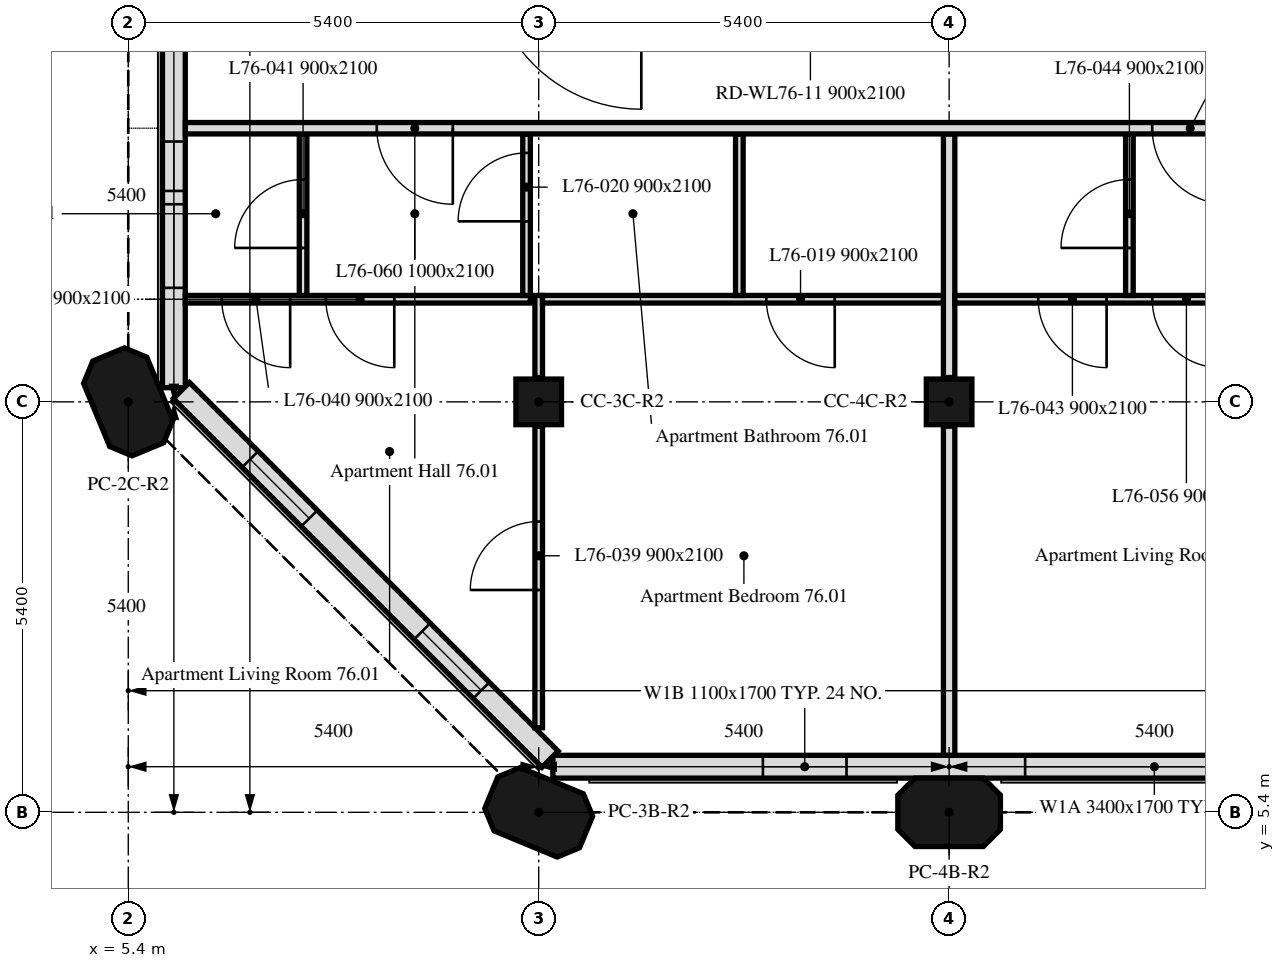
"""IFC4 building model, lengths in metres.
Left out: names, types, materials, properties, quantities, classifications, styles, units other than length and angle.
Written with IfcOpenShell. Run it as: python <this file> out.ifc"""

import sys

from ifc_helpers import new_model, si_unit, direction, frame, frame_2d, origin, origin_2d, place, context, subcontext, project, spatial, polyline, rectangle, outline, extrude, element, fill, save


model = new_model("IFC4")
c1 = context("Model", 3, precision=1e-05, world=origin(), true_north=direction((0.0, 1.0)))
c2 = subcontext(c1, "Body", "Model", "MODEL_VIEW")
j1 = project(units=[si_unit("LENGTHUNIT", "METRE"), si_unit("PLANEANGLEUNIT", "RADIAN")], contexts=[c1])
p1 = place(None, origin())
s1 = spatial("IfcSite", under=j1, at=p1, CompositionType="ELEMENT")
p2 = place(p1, origin())
s2 = spatial("IfcBuilding", under=s1, at=p2, CompositionType="ELEMENT")
p3 = place(p2, frame((0.0, 0.0, 304.9)))
s3 = spatial("IfcBuildingStorey", under=s2, at=p3, CompositionType="ELEMENT", Elevation=304.9)
for number, where, z_axis, x_axis in (
    (1, (10.8, 5.4, 0.0), (0.0, 0.0, 1.0), (-0.924, 0.383, 0.0)),
    (2, (16.2, 5.4, 0.0), (0.0, 0.0, 1.0), (1.0, 0.0, 0.0)),
    (3, (5.4, 10.8, 0.0), (0.0, 0.0, 1.0), (-0.383, 0.924, 0.0)),
):
    element("IfcColumn", number, at=place(p3, frame(where, z_axis=z_axis, x_axis=x_axis)), inside=s3, PredefinedType="COLUMN", context=c2, shape_type="SweptSolid", body=[
        extrude(outline(polyline([(-0.45, -0.45), (0.45, -0.45), (0.675, -0.225), (0.675, 0.225), (0.45, 0.45), (-0.45, 0.45), (-0.675, 0.225), (-0.675, -0.225), (-0.45, -0.45)])), origin(), (0.0, 0.0, 1.0), 2.8),
    ])
for number, where, z_axis, x_axis in (
    (4, (10.8, 10.8, 0.0), (0.0, 0.0, 1.0), (1.0, 0.0, 0.0)),
    (5, (16.2, 10.8, 0.0), (0.0, 0.0, 1.0), (1.0, 0.0, 0.0)),
):
    element("IfcColumn", number, at=place(p3, frame(where, z_axis=z_axis, x_axis=x_axis)), inside=s3, PredefinedType="COLUMN", context=c2, shape_type="SweptSolid", body=[
        extrude(rectangle(XDim=0.6, YDim=0.6, at=origin_2d()), origin(), (0.0, 0.0, 1.0), 2.8),
    ])
p4 = place(p3, frame((10.986, 6.0, 0.0), z_axis=(0.0, 0.0, 1.0), x_axis=(1.0, 0.0, 0.0)))
e6 = element("IfcWall", 6, at=p4, inside=s3, PredefinedType="SOLIDWALL", context=c2, shape_type="SweptSolid", body=[
    extrude(rectangle(XDim=32.027, YDim=0.3, at=frame_2d((16.014, 0.0))), origin(), (0.0, 0.0, 1.0), 2.8),
])
p5 = place(p4, frame((2.764, 0.0, 0.9)))
e7 = element("IfcOpeningElement", 7, at=p5, cuts=e6, PredefinedType="OPENING", context=c2, shape_type="SweptSolid", body=[
    extrude(rectangle(XDim=1.1, YDim=1.7, at=frame_2d((0.55, 0.85))), frame((0.0, 0.16, 0.0), z_axis=(0.0, -1.0, 0.0), x_axis=(1.0, 0.0, 0.0)), (0.0, 0.0, 1.0), 0.32),
])
p6 = place(p4, frame((6.214, 0.0, 0.9)))
e8 = element("IfcOpeningElement", 8, at=p6, cuts=e6, PredefinedType="OPENING", context=c2, shape_type="SweptSolid", body=[
    extrude(rectangle(XDim=3.4, YDim=1.7, at=frame_2d((1.7, 0.85))), frame((0.0, 0.16, 0.0), z_axis=(0.0, -1.0, 0.0), x_axis=(1.0, 0.0, 0.0)), (0.0, 0.0, 1.0), 0.32),
])
p7 = place(p4, frame((13.564, 0.0, 0.9)))
e9 = element("IfcOpeningElement", 9, at=p7, cuts=e6, PredefinedType="OPENING", context=c2, shape_type="SweptSolid", body=[
    extrude(rectangle(XDim=1.1, YDim=1.7, at=frame_2d((0.55, 0.85))), frame((0.0, 0.16, 0.0), z_axis=(0.0, -1.0, 0.0), x_axis=(1.0, 0.0, 0.0)), (0.0, 0.0, 1.0), 0.32),
])
p8 = place(p4, frame((17.014, 0.0, 0.9)))
e10 = element("IfcOpeningElement", 10, at=p8, cuts=e6, PredefinedType="OPENING", context=c2, shape_type="SweptSolid", body=[
    extrude(rectangle(XDim=3.4, YDim=1.7, at=frame_2d((1.7, 0.85))), frame((0.0, 0.16, 0.0), z_axis=(0.0, -1.0, 0.0), x_axis=(1.0, 0.0, 0.0)), (0.0, 0.0, 1.0), 0.32),
])
p9 = place(p4, frame((24.364, 0.0, 0.9)))
e11 = element("IfcOpeningElement", 11, at=p9, cuts=e6, PredefinedType="OPENING", context=c2, shape_type="SweptSolid", body=[
    extrude(rectangle(XDim=1.1, YDim=1.7, at=frame_2d((0.55, 0.85))), frame((0.0, 0.16, 0.0), z_axis=(0.0, -1.0, 0.0), x_axis=(1.0, 0.0, 0.0)), (0.0, 0.0, 1.0), 0.32),
])
p10 = place(p4, frame((27.814, 0.0, 0.9)))
e12 = element("IfcOpeningElement", 12, at=p10, cuts=e6, PredefinedType="OPENING", context=c2, shape_type="SweptSolid", body=[
    extrude(rectangle(XDim=3.4, YDim=1.7, at=frame_2d((1.7, 0.85))), frame((0.0, 0.16, 0.0), z_axis=(0.0, -1.0, 0.0), x_axis=(1.0, 0.0, 0.0)), (0.0, 0.0, 1.0), 0.32),
])
p11 = place(p3, frame((6.0, 16.2, 0.0), z_axis=(0.0, 0.0, 1.0), x_axis=(0.0, -1.0, 0.0)))
e13 = element("IfcWall", 13, at=p11, inside=s3, PredefinedType="SOLIDWALL", context=c2, shape_type="SweptSolid", body=[
    extrude(rectangle(XDim=5.214, YDim=0.3, at=frame_2d((2.607, 0.0))), origin(), (0.0, 0.0, 1.0), 2.8),
])
p12 = place(p11, frame((1.975, 0.0, 0.9)))
e14 = element("IfcOpeningElement", 14, at=p12, cuts=e13, PredefinedType="OPENING", context=c2, shape_type="SweptSolid", body=[
    extrude(rectangle(XDim=0.65, YDim=1.7, at=frame_2d((0.325, 0.85))), frame((0.0, 0.16, 0.0), z_axis=(0.0, -1.0, 0.0), x_axis=(1.0, 0.0, 0.0)), (0.0, 0.0, 1.0), 0.32),
])
p13 = place(p11, frame((2.8, 0.0, 0.9)))
e15 = element("IfcOpeningElement", 15, at=p13, cuts=e13, PredefinedType="OPENING", context=c2, shape_type="SweptSolid", body=[
    extrude(rectangle(XDim=1.1, YDim=1.7, at=frame_2d((0.55, 0.85))), frame((0.0, 0.16, 0.0), z_axis=(0.0, -1.0, 0.0), x_axis=(1.0, 0.0, 0.0)), (0.0, 0.0, 1.0), 0.32),
])
p14 = place(p3, frame((6.099, 10.949, 0.0), z_axis=(0.0, 0.0, 1.0), x_axis=(0.707106781187, -0.707106781187, 0.0)))
e16 = element("IfcWall", 16, at=p14, inside=s3, PredefinedType="SOLIDWALL", context=c2, shape_type="SweptSolid", body=[
    extrude(rectangle(XDim=6.86, YDim=0.3, at=frame_2d((3.43, 0.0))), origin(), (0.0, 0.0, 1.0), 2.8),
])
p15 = place(p14, frame((1.28, 0.0, 0.9)))
e17 = element("IfcOpeningElement", 17, at=p15, cuts=e16, PredefinedType="OPENING", context=c2, shape_type="SweptSolid", body=[
    extrude(rectangle(XDim=1.1, YDim=1.7, at=frame_2d((0.55, 0.85))), frame((0.0, 0.16, 0.0), z_axis=(0.0, -1.0, 0.0), x_axis=(1.0, 0.0, 0.0)), (0.0, 0.0, 1.0), 0.32),
])
p16 = place(p14, frame((4.48, 0.0, 0.9)))
e18 = element("IfcOpeningElement", 18, at=p16, cuts=e16, PredefinedType="OPENING", context=c2, shape_type="SweptSolid", body=[
    extrude(rectangle(XDim=1.1, YDim=1.7, at=frame_2d((0.55, 0.85))), frame((0.0, 0.16, 0.0), z_axis=(0.0, -1.0, 0.0), x_axis=(1.0, 0.0, 0.0)), (0.0, 0.0, 1.0), 0.32),
])
p17 = place(p3, frame((10.8, 6.512, 0.0), z_axis=(0.0, 0.0, 1.0), x_axis=(0.0, 1.0, 0.0)))
e19 = element("IfcWall", 19, at=p17, inside=s3, PredefinedType="PARTITIONING", context=c2, shape_type="SweptSolid", body=[
    extrude(rectangle(XDim=3.968, YDim=0.1, at=frame_2d((1.984, 0.0))), origin(), (0.0, 0.0, 1.0), 2.8),
])
p18 = place(p17, frame((1.813, 0.0, 0.0)))
e20 = element("IfcOpeningElement", 20, at=p18, cuts=e19, PredefinedType="OPENING", context=c2, shape_type="SweptSolid", body=[
    extrude(rectangle(XDim=0.9, YDim=2.1, at=frame_2d((0.45, 1.05))), frame((0.0, 0.05, 0.0), z_axis=(0.0, -1.0, 0.0), x_axis=(1.0, 0.0, 0.0)), (0.0, 0.0, 1.0), 0.1),
])
p19 = place(p3, frame((10.8, 11.12, 0.0), z_axis=(0.0, 0.0, 1.0), x_axis=(0.0, 1.0, 0.0)))
e21 = element("IfcWall", 21, at=p19, inside=s3, PredefinedType="PARTITIONING", context=c2, shape_type="SweptSolid", body=[
    extrude(rectangle(XDim=1.08, YDim=0.1, at=frame_2d((0.54, 0.0))), origin(), (0.0, 0.0, 1.0), 2.8),
])
p20 = place(p3, frame((10.69, 12.15, 0.0), z_axis=(0.0, 0.0, 1.0), x_axis=(-1.0, 0.0, 0.0)))
e22 = element("IfcWall", 22, at=p20, inside=s3, PredefinedType="PARTITIONING", context=c2, shape_type="SweptSolid", body=[
    extrude(rectangle(XDim=4.539, YDim=0.1, at=frame_2d((2.27, 0.0))), origin(), (0.0, 0.0, 1.0), 2.8),
])
p21 = place(p20, frame((3.16, 0.0, 0.0)))
e23 = element("IfcOpeningElement", 23, at=p21, cuts=e22, PredefinedType="OPENING", context=c2, shape_type="SweptSolid", body=[
    extrude(rectangle(XDim=0.9, YDim=2.1, at=frame_2d((0.45, 1.05))), frame((0.0, 0.05, 0.0), z_axis=(0.0, -1.0, 0.0), x_axis=(1.0, 0.0, 0.0)), (0.0, 0.0, 1.0), 0.1),
])
p22 = place(p20, frame((1.79, 0.0, 0.0)))
e24 = element("IfcOpeningElement", 24, at=p22, cuts=e22, PredefinedType="OPENING", context=c2, shape_type="SweptSolid", body=[
    extrude(rectangle(XDim=0.9, YDim=2.1, at=frame_2d((0.45, 1.05))), frame((0.0, 0.05, 0.0), z_axis=(0.0, -1.0, 0.0), x_axis=(1.0, 0.0, 0.0)), (0.0, 0.0, 1.0), 0.1),
])
p23 = place(p3, frame((16.2, 6.151, 0.0), z_axis=(0.0, 0.0, 1.0), x_axis=(0.0, 1.0, 0.0)))
e25 = element("IfcWall", 25, at=p23, inside=s3, PredefinedType="PARTITIONING", context=c2, shape_type="SweptSolid", body=[
    extrude(rectangle(XDim=4.329, YDim=0.15, at=frame_2d((2.165, 0.0))), origin(), (0.0, 0.0, 1.0), 2.8),
])
p24 = place(p3, frame((16.125, 12.15, 0.0), z_axis=(0.0, 0.0, 1.0), x_axis=(-1.0, 0.0, 0.0)))
e26 = element("IfcWall", 26, at=p24, inside=s3, PredefinedType="PARTITIONING", context=c2, shape_type="SweptSolid", body=[
    extrude(rectangle(XDim=5.275, YDim=0.1, at=frame_2d((2.637, 0.0))), origin(), (0.0, 0.0, 1.0), 2.8),
])
p25 = place(p24, frame((1.43, 0.0, 0.0)))
e27 = element("IfcOpeningElement", 27, at=p25, cuts=e26, PredefinedType="OPENING", context=c2, shape_type="SweptSolid", body=[
    extrude(rectangle(XDim=0.9, YDim=2.1, at=frame_2d((0.45, 1.05))), frame((0.0, 0.05, 0.0), z_axis=(0.0, -1.0, 0.0), x_axis=(1.0, 0.0, 0.0)), (0.0, 0.0, 1.0), 0.1),
])
p26 = place(p3, frame((7.7, 12.2, 0.0), z_axis=(0.0, 0.0, 1.0), x_axis=(0.0, 1.0, 0.0)))
e28 = element("IfcWall", 28, at=p26, inside=s3, PredefinedType="PARTITIONING", context=c2, shape_type="SweptSolid", body=[
    extrude(rectangle(XDim=2.125, YDim=0.1, at=frame_2d((1.062, 0.0))), origin(), (0.0, 0.0, 1.0), 2.8),
])
p27 = place(p26, frame((0.625, 0.0, 0.0)))
e29 = element("IfcOpeningElement", 29, at=p27, cuts=e28, PredefinedType="OPENING", context=c2, shape_type="SweptSolid", body=[
    extrude(rectangle(XDim=0.9, YDim=2.1, at=frame_2d((0.45, 1.05))), frame((0.0, 0.05, 0.0), z_axis=(0.0, -1.0, 0.0), x_axis=(1.0, 0.0, 0.0)), (0.0, 0.0, 1.0), 0.1),
])
p28 = place(p3, frame((10.64, 12.2, 0.0), z_axis=(0.0, 0.0, 1.0), x_axis=(0.0, 1.0, 0.0)))
e30 = element("IfcWall", 30, at=p28, inside=s3, PredefinedType="PARTITIONING", context=c2, shape_type="SweptSolid", body=[
    extrude(rectangle(XDim=2.125, YDim=0.1, at=frame_2d((1.062, 0.0))), origin(), (0.0, 0.0, 1.0), 2.8),
])
p29 = place(p28, frame((0.975, 0.0, 0.0)))
e31 = element("IfcOpeningElement", 31, at=p29, cuts=e30, PredefinedType="OPENING", context=c2, shape_type="SweptSolid", body=[
    extrude(rectangle(XDim=0.9, YDim=2.1, at=frame_2d((0.45, 1.05))), frame((0.0, 0.05, 0.0), z_axis=(0.0, -1.0, 0.0), x_axis=(1.0, 0.0, 0.0)), (0.0, 0.0, 1.0), 0.1),
])
p30 = place(p3, frame((13.44, 12.2, 0.0), z_axis=(0.0, 0.0, 1.0), x_axis=(0.0, 1.0, 0.0)))
e32 = element("IfcWall", 32, at=p30, inside=s3, PredefinedType="PARTITIONING", context=c2, shape_type="SweptSolid", body=[
    extrude(rectangle(XDim=2.125, YDim=0.1, at=frame_2d((1.062, 0.0))), origin(), (0.0, 0.0, 1.0), 2.8),
])
p31 = place(p3, frame((16.2, 11.12, 0.0), z_axis=(0.0, 0.0, 1.0), x_axis=(0.0, 1.0, 0.0)))
e33 = element("IfcWall", 33, at=p31, inside=s3, PredefinedType="PARTITIONING", context=c2, shape_type="SweptSolid", body=[
    extrude(rectangle(XDim=3.205, YDim=0.15, at=frame_2d((1.603, 0.0))), origin(), (0.0, 0.0, 1.0), 2.8),
])
p32 = place(p3, frame((21.372, 12.15, 0.0), z_axis=(0.0, 0.0, 1.0), x_axis=(-1.0, 0.0, 0.0)))
e34 = element("IfcWall", 34, at=p32, inside=s3, PredefinedType="PARTITIONING", context=c2, shape_type="SweptSolid", body=[
    extrude(rectangle(XDim=5.097, YDim=0.1, at=frame_2d((2.549, 0.0))), origin(), (0.0, 0.0, 1.0), 2.8),
])
p33 = place(p32, frame((3.1, 0.0, 0.0)))
e35 = element("IfcOpeningElement", 35, at=p33, cuts=e34, PredefinedType="OPENING", context=c2, shape_type="SweptSolid", body=[
    extrude(rectangle(XDim=0.9, YDim=2.1, at=frame_2d((0.45, 1.05))), frame((0.0, 0.05, 0.0), z_axis=(0.0, -1.0, 0.0), x_axis=(1.0, 0.0, 0.0)), (0.0, 0.0, 1.0), 0.1),
])
p34 = place(p32, frame((1.6, 0.0, 0.0)))
e36 = element("IfcOpeningElement", 36, at=p34, cuts=e34, PredefinedType="OPENING", context=c2, shape_type="SweptSolid", body=[
    extrude(rectangle(XDim=0.9, YDim=2.1, at=frame_2d((0.45, 1.05))), frame((0.0, 0.05, 0.0), z_axis=(0.0, -1.0, 0.0), x_axis=(1.0, 0.0, 0.0)), (0.0, 0.0, 1.0), 0.1),
])
p35 = place(p3, frame((18.572, 12.2, 0.0), z_axis=(0.0, 0.0, 1.0), x_axis=(0.0, 1.0, 0.0)))
e37 = element("IfcWall", 37, at=p35, inside=s3, PredefinedType="PARTITIONING", context=c2, shape_type="SweptSolid", body=[
    extrude(rectangle(XDim=2.125, YDim=0.1, at=frame_2d((1.062, 0.0))), origin(), (0.0, 0.0, 1.0), 2.8),
])
p36 = place(p35, frame((0.625, 0.0, 0.0)))
e38 = element("IfcOpeningElement", 38, at=p36, cuts=e37, PredefinedType="OPENING", context=c2, shape_type="SweptSolid", body=[
    extrude(rectangle(XDim=0.9, YDim=2.1, at=frame_2d((0.45, 1.05))), frame((0.0, 0.05, 0.0), z_axis=(0.0, -1.0, 0.0), x_axis=(1.0, 0.0, 0.0)), (0.0, 0.0, 1.0), 0.1),
])
p37 = place(p3, frame((47.849, 14.4, 0.0), z_axis=(0.0, 0.0, 1.0), x_axis=(-1.0, 0.0, 0.0)))
e39 = element("IfcWall", 39, at=p37, inside=s3, PredefinedType="PARTITIONING", context=c2, shape_type="SweptSolid", body=[
    extrude(rectangle(XDim=41.698, YDim=0.15, at=frame_2d((20.849, 0.0))), origin(), (0.0, 0.0, 1.0), 2.8),
])
p38 = place(p37, frame((38.179, 0.0, 0.0)))
e40 = element("IfcOpeningElement", 40, at=p38, cuts=e39, PredefinedType="OPENING", context=c2, shape_type="SweptSolid", body=[
    extrude(rectangle(XDim=1.0, YDim=2.1, at=frame_2d((0.5, 1.05))), frame((0.0, 0.075, 0.0), z_axis=(0.0, -1.0, 0.0), x_axis=(1.0, 0.0, 0.0)), (0.0, 0.0, 1.0), 0.15),
])
p39 = place(p37, frame((27.977, 0.0, 0.0)))
e41 = element("IfcOpeningElement", 41, at=p39, cuts=e39, PredefinedType="OPENING", context=c2, shape_type="SweptSolid", body=[
    extrude(rectangle(XDim=1.0, YDim=2.1, at=frame_2d((0.5, 1.05))), frame((0.0, 0.075, 0.0), z_axis=(0.0, -1.0, 0.0), x_axis=(1.0, 0.0, 0.0)), (0.0, 0.0, 1.0), 0.15),
])
p40 = place(p37, frame((16.399, 0.0, 0.0)))
e42 = element("IfcOpeningElement", 42, at=p40, cuts=e39, PredefinedType="OPENING", context=c2, shape_type="SweptSolid", body=[
    extrude(rectangle(XDim=1.0, YDim=2.1, at=frame_2d((0.5, 1.05))), frame((0.0, 0.075, 0.0), z_axis=(0.0, -1.0, 0.0), x_axis=(1.0, 0.0, 0.0)), (0.0, 0.0, 1.0), 0.15),
])
p41 = place(p37, frame((5.476, 0.0, 0.0)))
e43 = element("IfcOpeningElement", 43, at=p41, cuts=e39, PredefinedType="OPENING", context=c2, shape_type="SweptSolid", body=[
    extrude(rectangle(XDim=1.0, YDim=2.1, at=frame_2d((0.5, 1.05))), frame((0.0, 0.075, 0.0), z_axis=(0.0, -1.0, 0.0), x_axis=(1.0, 0.0, 0.0)), (0.0, 0.0, 1.0), 0.15),
])
p42 = place(p5, origin())
e44 = element("IfcWindow", 44, at=p42, inside=s3, PartitioningType="SINGLE_PANEL", PredefinedType="WINDOW", context=c2, shape_type="SweptSolid", body=[
    extrude(rectangle(XDim=1.1, YDim=1.7, at=frame_2d((0.55, 0.85))), frame((0.0, 0.03, 0.0), z_axis=(0.0, -1.0, 0.0), x_axis=(1.0, 0.0, 0.0)), (0.0, 0.0, 1.0), 0.06),
])
fill(e7, e44)
p43 = place(p6, origin())
e45 = element("IfcWindow", 45, at=p43, inside=s3, PartitioningType="SINGLE_PANEL", PredefinedType="WINDOW", context=c2, shape_type="SweptSolid", body=[
    extrude(rectangle(XDim=3.4, YDim=1.7, at=frame_2d((1.7, 0.85))), frame((0.0, 0.03, 0.0), z_axis=(0.0, -1.0, 0.0), x_axis=(1.0, 0.0, 0.0)), (0.0, 0.0, 1.0), 0.06),
])
fill(e8, e45)
p44 = place(p12, origin())
e46 = element("IfcWindow", 46, at=p44, inside=s3, PartitioningType="SINGLE_PANEL", PredefinedType="WINDOW", context=c2, shape_type="SweptSolid", body=[
    extrude(rectangle(XDim=0.65, YDim=1.7, at=frame_2d((0.325, 0.85))), frame((0.0, 0.03, 0.0), z_axis=(0.0, -1.0, 0.0), x_axis=(1.0, 0.0, 0.0)), (0.0, 0.0, 1.0), 0.06),
])
fill(e14, e46)
p45 = place(p13, origin())
e47 = element("IfcWindow", 47, at=p45, inside=s3, PartitioningType="SINGLE_PANEL", PredefinedType="WINDOW", context=c2, shape_type="SweptSolid", body=[
    extrude(rectangle(XDim=1.1, YDim=1.7, at=frame_2d((0.55, 0.85))), frame((0.0, 0.03, 0.0), z_axis=(0.0, -1.0, 0.0), x_axis=(1.0, 0.0, 0.0)), (0.0, 0.0, 1.0), 0.06),
])
fill(e15, e47)
p46 = place(p15, origin())
e48 = element("IfcWindow", 48, at=p46, inside=s3, PartitioningType="SINGLE_PANEL", PredefinedType="WINDOW", context=c2, shape_type="SweptSolid", body=[
    extrude(rectangle(XDim=1.1, YDim=1.7, at=frame_2d((0.55, 0.85))), frame((0.0, 0.03, 0.0), z_axis=(0.0, -1.0, 0.0), x_axis=(1.0, 0.0, 0.0)), (0.0, 0.0, 1.0), 0.06),
])
fill(e17, e48)
p47 = place(p16, origin())
e49 = element("IfcWindow", 49, at=p47, inside=s3, PartitioningType="SINGLE_PANEL", PredefinedType="WINDOW", context=c2, shape_type="SweptSolid", body=[
    extrude(rectangle(XDim=1.1, YDim=1.7, at=frame_2d((0.55, 0.85))), frame((0.0, 0.03, 0.0), z_axis=(0.0, -1.0, 0.0), x_axis=(1.0, 0.0, 0.0)), (0.0, 0.0, 1.0), 0.06),
])
fill(e18, e49)
p48 = place(p25, origin())
e50 = element("IfcDoor", 50, at=p48, inside=s3, OperationType="SINGLE_SWING_LEFT", PredefinedType="DOOR", context=c2, shape_type="SweptSolid", body=[
    extrude(rectangle(XDim=0.9, YDim=2.1, at=frame_2d((0.45, 1.05))), frame((0.0, 0.025, 0.0), z_axis=(0.0, -1.0, 0.0), x_axis=(1.0, 0.0, 0.0)), (0.0, 0.0, 1.0), 0.05),
])
fill(e27, e50)
p49 = place(p29, origin())
e51 = element("IfcDoor", 51, at=p49, inside=s3, OperationType="SINGLE_SWING_RIGHT", PredefinedType="DOOR", context=c2, shape_type="SweptSolid", body=[
    extrude(rectangle(XDim=0.9, YDim=2.1, at=frame_2d((0.45, 1.05))), frame((0.0, 0.025, 0.0), z_axis=(0.0, -1.0, 0.0), x_axis=(1.0, 0.0, 0.0)), (0.0, 0.0, 1.0), 0.05),
])
fill(e31, e51)
p50 = place(p18, origin())
e52 = element("IfcDoor", 52, at=p50, inside=s3, OperationType="SINGLE_SWING_RIGHT", PredefinedType="DOOR", context=c2, shape_type="SweptSolid", body=[
    extrude(rectangle(XDim=0.9, YDim=2.1, at=frame_2d((0.45, 1.05))), frame((0.0, 0.025, 0.0), z_axis=(0.0, -1.0, 0.0), x_axis=(1.0, 0.0, 0.0)), (0.0, 0.0, 1.0), 0.05),
])
fill(e20, e52)
p51 = place(p21, origin())
e53 = element("IfcDoor", 53, at=p51, inside=s3, OperationType="SINGLE_SWING_RIGHT", PredefinedType="DOOR", context=c2, shape_type="SweptSolid", body=[
    extrude(rectangle(XDim=0.9, YDim=2.1, at=frame_2d((0.45, 1.05))), frame((0.0, 0.025, 0.0), z_axis=(0.0, -1.0, 0.0), x_axis=(1.0, 0.0, 0.0)), (0.0, 0.0, 1.0), 0.05),
])
fill(e23, e53)
p52 = place(p27, origin())
e54 = element("IfcDoor", 54, at=p52, inside=s3, OperationType="SINGLE_SWING_RIGHT", PredefinedType="DOOR", context=c2, shape_type="SweptSolid", body=[
    extrude(rectangle(XDim=0.9, YDim=2.1, at=frame_2d((0.45, 1.05))), frame((0.0, 0.025, 0.0), z_axis=(0.0, -1.0, 0.0), x_axis=(1.0, 0.0, 0.0)), (0.0, 0.0, 1.0), 0.05),
])
fill(e29, e54)
p53 = place(p33, origin())
e55 = element("IfcDoor", 55, at=p53, inside=s3, OperationType="SINGLE_SWING_RIGHT", PredefinedType="DOOR", context=c2, shape_type="SweptSolid", body=[
    extrude(rectangle(XDim=0.9, YDim=2.1, at=frame_2d((0.45, 1.05))), frame((0.0, 0.025, 0.0), z_axis=(0.0, -1.0, 0.0), x_axis=(1.0, 0.0, 0.0)), (0.0, 0.0, 1.0), 0.05),
])
fill(e35, e55)
p54 = place(p36, origin())
e56 = element("IfcDoor", 56, at=p54, inside=s3, OperationType="SINGLE_SWING_LEFT", PredefinedType="DOOR", context=c2, shape_type="SweptSolid", body=[
    extrude(rectangle(XDim=0.9, YDim=2.1, at=frame_2d((0.45, 1.05))), frame((0.0, 0.025, 0.0), z_axis=(0.0, -1.0, 0.0), x_axis=(1.0, 0.0, 0.0)), (0.0, 0.0, 1.0), 0.05),
])
fill(e38, e56)
p55 = place(p22, origin())
e57 = element("IfcDoor", 57, at=p55, inside=s3, OperationType="SINGLE_SWING_LEFT", PredefinedType="DOOR", context=c2, shape_type="SweptSolid", body=[
    extrude(rectangle(XDim=0.9, YDim=2.1, at=frame_2d((0.45, 1.05))), frame((0.0, 0.025, 0.0), z_axis=(0.0, -1.0, 0.0), x_axis=(1.0, 0.0, 0.0)), (0.0, 0.0, 1.0), 0.05),
])
fill(e24, e57)
p56 = place(p34, origin())
e58 = element("IfcDoor", 58, at=p56, inside=s3, OperationType="SINGLE_SWING_LEFT", PredefinedType="DOOR", context=c2, shape_type="SweptSolid", body=[
    extrude(rectangle(XDim=0.9, YDim=2.1, at=frame_2d((0.45, 1.05))), frame((0.0, 0.025, 0.0), z_axis=(0.0, -1.0, 0.0), x_axis=(1.0, 0.0, 0.0)), (0.0, 0.0, 1.0), 0.05),
])
fill(e36, e58)
p57 = place(p38, origin())
e59 = element("IfcDoor", 59, at=p57, inside=s3, OperationType="SINGLE_SWING_RIGHT", PredefinedType="DOOR", context=c2, shape_type="SweptSolid", body=[
    extrude(rectangle(XDim=1.0, YDim=2.1, at=frame_2d((0.5, 1.05))), frame((0.0, 0.025, 0.0), z_axis=(0.0, -1.0, 0.0), x_axis=(1.0, 0.0, 0.0)), (0.0, 0.0, 1.0), 0.05),
])
fill(e40, e59)
p58 = place(p39, origin())
e60 = element("IfcDoor", 60, at=p58, inside=s3, OperationType="SINGLE_SWING_RIGHT", PredefinedType="DOOR", context=c2, shape_type="SweptSolid", body=[
    extrude(rectangle(XDim=1.0, YDim=2.1, at=frame_2d((0.5, 1.05))), frame((0.0, 0.025, 0.0), z_axis=(0.0, -1.0, 0.0), x_axis=(1.0, 0.0, 0.0)), (0.0, 0.0, 1.0), 0.05),
])
fill(e41, e60)
save(model, sys.argv[1])
